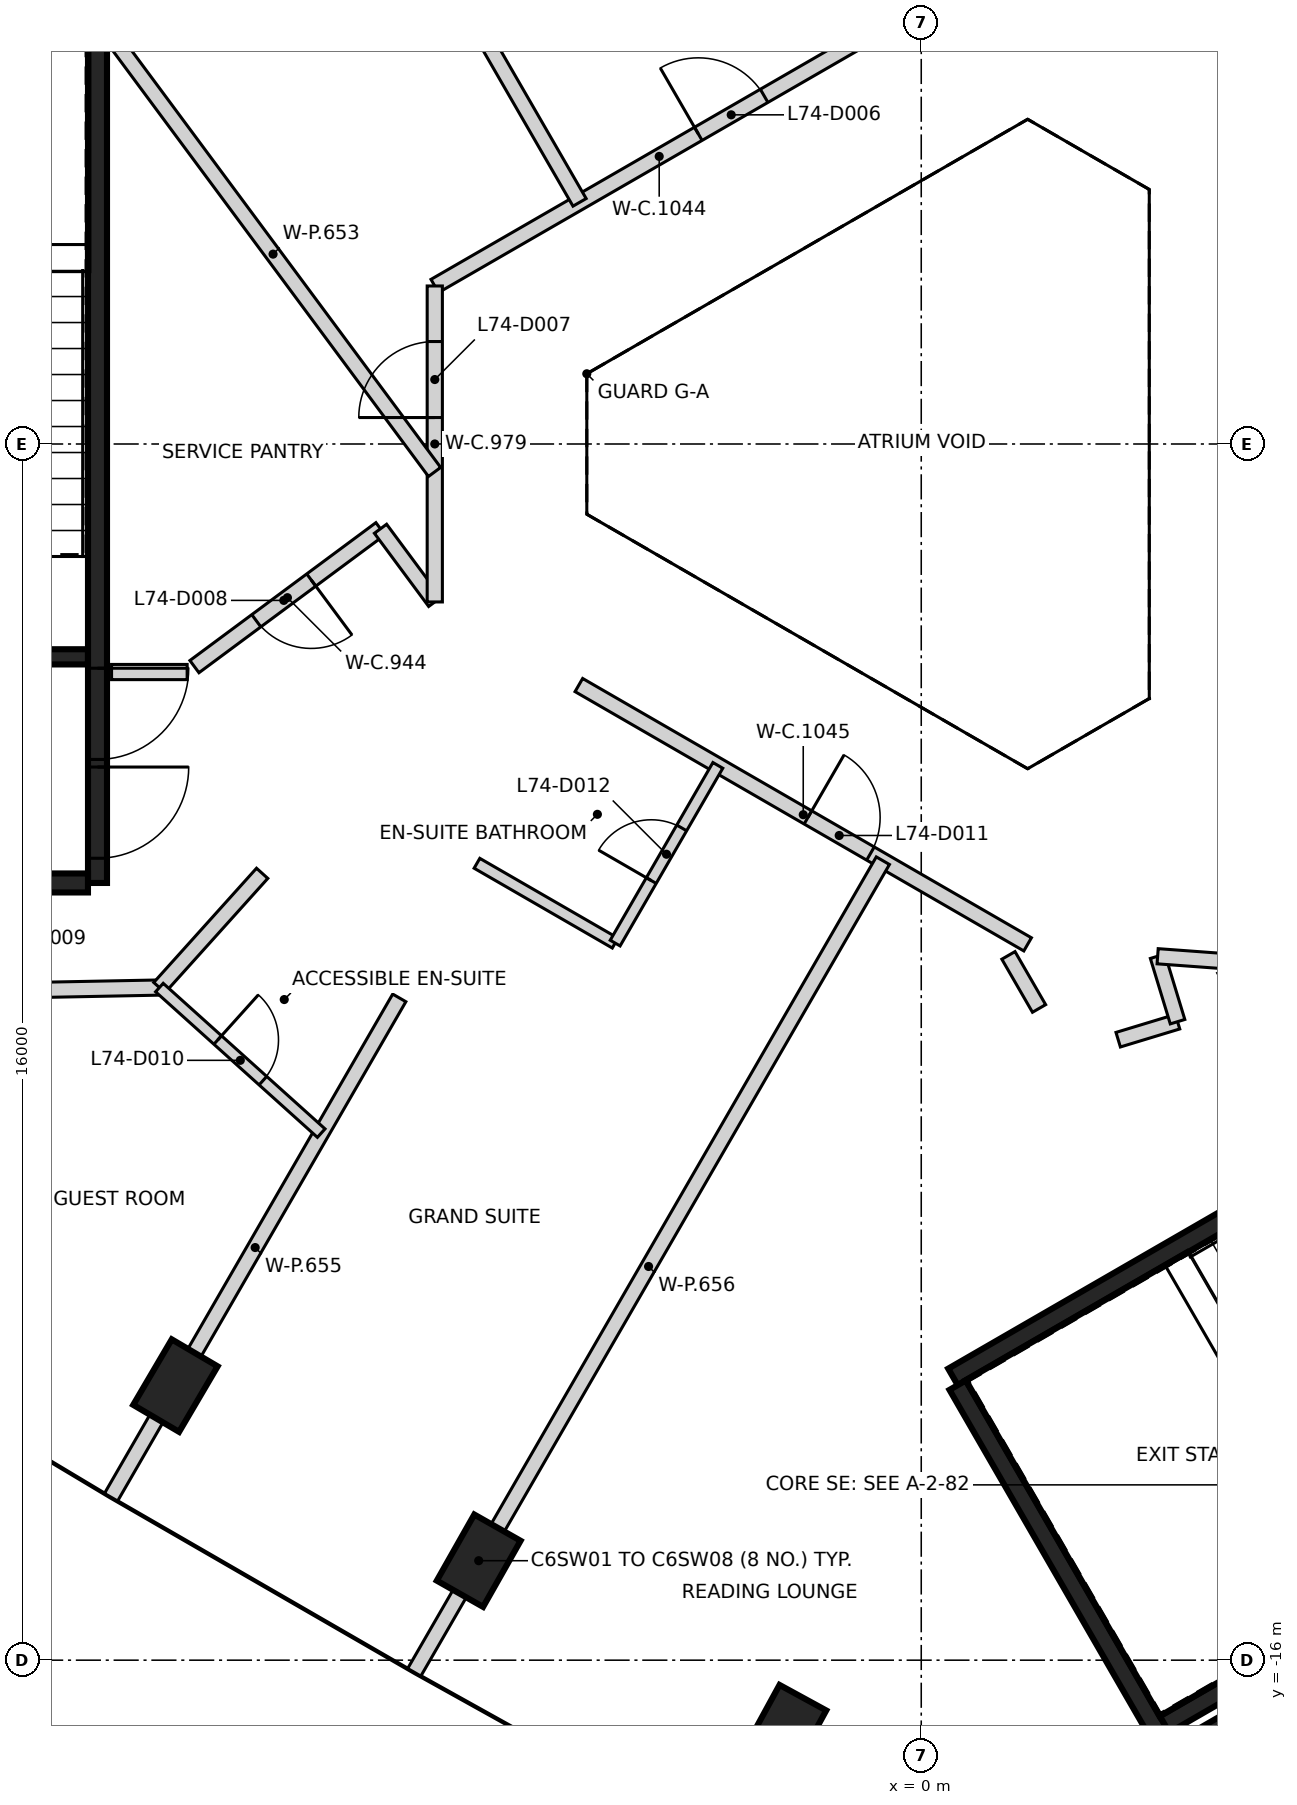
"""IFC4 building model, lengths in metres.
Left out: names, types, materials, properties, quantities, classifications, styles, units other than length and angle.
Written with IfcOpenShell. Run it as: python <this file> out.ifc"""

import sys

from ifc_helpers import new_model, si_unit, direction, frame, frame_2d, origin, origin_2d, place, context, subcontext, project, spatial, rectangle, extrude, element, fill, save


model = new_model("IFC4")
c1 = context("Model", 3, precision=1e-05, world=origin(), true_north=direction((0.0, 1.0)))
c2 = subcontext(c1, "Body", "Model", "MODEL_VIEW")
j1 = project(units=[si_unit("LENGTHUNIT", "METRE"), si_unit("PLANEANGLEUNIT", "RADIAN")], contexts=[c1])
p1 = place(None, origin())
s1 = spatial("IfcSite", under=j1, at=p1, CompositionType="ELEMENT")
p2 = place(p1, origin())
s2 = spatial("IfcBuilding", under=s1, at=p2, CompositionType="ELEMENT")
p3 = place(p2, frame((0.0, 0.0, 294.6)))
s3 = spatial("IfcBuildingStorey", under=s2, at=p3, CompositionType="ELEMENT", Elevation=294.6)
for number, where, z_axis, x_axis in (
    (1, (-9.812, -12.388, -0.35), (0.0, 0.0, 1.0), (0.507, 0.862, 0.0)),
    (2, (-5.822, -14.691, -0.35), (0.0, 0.0, 1.0), (0.493, 0.87, 0.0)),
    (3, (-1.797, -16.932, -0.35), (0.0, 0.0, 1.0), (0.479, 0.878, 0.0)),
):
    element("IfcColumn", number, at=place(p3, frame(where, z_axis=z_axis, x_axis=x_axis)), inside=s3, PredefinedType="COLUMN", context=c2, shape_type="SweptSolid", body=[
        extrude(rectangle(XDim=1.0, YDim=0.7, at=origin_2d()), origin(), (0.0, 0.0, 1.0), 3.6),
    ])
p4 = place(p3, frame((-10.837, 5.775, 0.0), z_axis=(0.0, 0.0, 1.0), x_axis=(0.0, -1.0, 0.0)))
e4 = element("IfcWall", 4, at=p4, inside=s3, PredefinedType="SHEAR", context=c2, shape_type="SweptSolid", body=[
    extrude(rectangle(XDim=11.55, YDim=0.25, at=frame_2d((5.775, 0.0))), origin(), (0.0, 0.0, 1.0), 3.25),
])
p5 = place(p4, frame((10.025, 0.0, 0.0)))
e5 = element("IfcOpeningElement", 5, at=p5, cuts=e4, PredefinedType="OPENING", context=c2, shape_type="SweptSolid", body=[
    extrude(rectangle(XDim=1.2, YDim=2.1, at=frame_2d((0.6, 1.05))), frame((0.0, 0.135, 0.0), z_axis=(0.0, -1.0, 0.0), x_axis=(1.0, 0.0, 0.0)), (0.0, 0.0, 1.0), 0.27),
])
p6 = place(p4, frame((8.725, 0.0, 0.0)))
e6 = element("IfcOpeningElement", 6, at=p6, cuts=e4, PredefinedType="OPENING", context=c2, shape_type="SweptSolid", body=[
    extrude(rectangle(XDim=1.2, YDim=2.1, at=frame_2d((0.6, 1.05))), frame((0.0, 0.135, 0.0), z_axis=(0.0, -1.0, 0.0), x_axis=(1.0, 0.0, 0.0)), (0.0, 0.0, 1.0), 0.27),
])
p7 = place(p3, frame((-10.963, -5.775, 0.0), z_axis=(0.0, 0.0, 1.0), x_axis=(-1.0, 0.0, 0.0)))
e7 = element("IfcWall", 7, at=p7, inside=s3, PredefinedType="SHEAR", context=c2, shape_type="SweptSolid", body=[
    extrude(rectangle(XDim=5.225, YDim=0.25, at=frame_2d((2.612, 0.0))), origin(), (0.0, 0.0, 1.0), 3.25),
])
p8 = place(p3, frame((-10.963, -2.8, 0.0), z_axis=(0.0, 0.0, 1.0), x_axis=(-1.0, 0.0, 0.0)))
e8 = element("IfcWall", 8, at=p8, inside=s3, PredefinedType="SHEAR", context=c2, shape_type="SweptSolid", body=[
    extrude(rectangle(XDim=5.098, YDim=0.2, at=frame_2d((2.549, 0.0))), origin(), (0.0, 0.0, 1.0), 3.25),
])
p9 = place(p8, frame((1.774, 0.0, 0.0)))
e9 = element("IfcOpeningElement", 9, at=p9, cuts=e8, PredefinedType="OPENING", context=c2, shape_type="SweptSolid", body=[
    extrude(rectangle(XDim=1.4, YDim=2.1, at=frame_2d((0.7, 1.05))), frame((0.0, 0.11, 0.0), z_axis=(0.0, -1.0, 0.0), x_axis=(1.0, 0.0, 0.0)), (0.0, 0.0, 1.0), 0.22),
])
p10 = place(p3, frame((0.417, -12.273, 0.0), z_axis=(0.0, 0.0, 1.0), x_axis=(0.866021906294, 0.500006057782, 0.0)))
e10 = element("IfcWall", 10, at=p10, inside=s3, PredefinedType="SHEAR", context=c2, shape_type="SweptSolid", body=[
    extrude(rectangle(XDim=11.55, YDim=0.25, at=frame_2d((5.775, 0.0))), origin(), (0.0, 0.0, 1.0), 3.25),
])
p11 = place(p10, frame((10.025, 0.0, 0.0)))
e11 = element("IfcOpeningElement", 11, at=p11, cuts=e10, PredefinedType="OPENING", context=c2, shape_type="SweptSolid", body=[
    extrude(rectangle(XDim=1.2, YDim=2.1, at=frame_2d((0.6, 1.05))), frame((0.0, 0.135, 0.0), z_axis=(0.0, -1.0, 0.0), x_axis=(1.0, 0.0, 0.0)), (0.0, 0.0, 1.0), 0.27),
])
p12 = place(p10, frame((8.725, 0.0, 0.0)))
e12 = element("IfcOpeningElement", 12, at=p12, cuts=e10, PredefinedType="OPENING", context=c2, shape_type="SweptSolid", body=[
    extrude(rectangle(XDim=1.2, YDim=2.1, at=frame_2d((0.6, 1.05))), frame((0.0, 0.135, 0.0), z_axis=(0.0, -1.0, 0.0), x_axis=(1.0, 0.0, 0.0)), (0.0, 0.0, 1.0), 0.27),
])
p13 = place(p3, frame((3.235, -17.153, 0.0), z_axis=(0.0, 0.0, 1.0), x_axis=(-0.500008851346, 0.866020293397, 0.0)))
e13 = element("IfcWall", 13, at=p13, inside=s3, PredefinedType="SHEAR", context=c2, shape_type="SweptSolid", body=[
    extrude(rectangle(XDim=5.51, YDim=0.25, at=frame_2d((2.755, 0.0))), origin(), (0.0, 0.0, 1.0), 3.25),
])
p14 = place(p3, frame((1.669, -18.19, 0.0), z_axis=(0.0, 0.0, 1.0), x_axis=(0.866042235819, 0.499970844928, 0.0)))
e14 = element("IfcWall", 14, at=p14, inside=s3, PredefinedType="SHEAR", context=c2, shape_type="SweptSolid", body=[
    extrude(rectangle(XDim=2.865, YDim=0.25, at=frame_2d((1.432, 0.0))), origin(), (0.0, 0.0, 1.0), 3.25),
])
p15 = place(p3, frame((5.431, -15.556, 0.0), z_axis=(0.0, 0.0, 1.0), x_axis=(-0.866022940537, -0.500004266446, 0.0)))
e15 = element("IfcWall", 15, at=p15, inside=s3, PredefinedType="SHEAR", context=c2, shape_type="SweptSolid", body=[
    extrude(rectangle(XDim=2.575, YDim=0.25, at=frame_2d((1.287, 0.0))), origin(), (0.0, 0.0, 1.0), 3.25),
])
p16 = place(p3, frame((-16.732, -7.282, 0.0), z_axis=(0.0, 0.0, 1.0), x_axis=(0.999809119854, 0.019537754635, 0.0)))
e16 = element("IfcWall", 16, at=p16, inside=s3, PredefinedType="PARTITIONING", context=c2, shape_type="SweptSolid", body=[
    extrude(rectangle(XDim=6.71, YDim=0.2, at=frame_2d((3.355, 0.0))), origin(), (0.0, 0.0, 1.0), 3.25),
])
p17 = place(p16, frame((3.451, 0.0, 0.0)))
e17 = element("IfcOpeningElement", 17, at=p17, cuts=e16, PredefinedType="OPENING", context=c2, shape_type="SweptSolid", body=[
    extrude(rectangle(XDim=1.0, YDim=2.1, at=frame_2d((0.5, 1.05))), frame((0.0, 0.11, 0.0), z_axis=(0.0, -1.0, 0.0), x_axis=(1.0, 0.0, 0.0)), (0.0, 0.0, 1.0), 0.22),
])
p18 = place(p3, frame((-10.652, -3.0, 0.0), z_axis=(0.0, 0.0, 1.0), x_axis=(1.0, 0.0, 0.0)))
e18 = element("IfcWall", 18, at=p18, inside=s3, PredefinedType="PARTITIONING", context=c2, shape_type="SweptSolid", body=[
    extrude(rectangle(XDim=0.994, YDim=0.2, at=frame_2d((0.497, 0.0))), origin(), (0.0, 0.0, 1.0), 3.25),
])
p19 = place(p3, frame((-10.023, -7.151, 0.0), z_axis=(0.0, 0.0, 1.0), x_axis=(0.668804583793, 0.743438248073, 0.0)))
e19 = element("IfcWall", 19, at=p19, inside=s3, PredefinedType="PARTITIONING", context=c2, shape_type="SweptSolid", body=[
    extrude(rectangle(XDim=2.021, YDim=0.2, at=frame_2d((1.011, 0.0))), origin(), (0.0, 0.0, 1.0), 3.25),
])
p20 = place(p3, frame((-7.115, -1.115, 0.0), z_axis=(0.0, 0.0, 1.0), x_axis=(-0.803344165632, -0.595515030495, 0.0)))
e20 = element("IfcWall", 20, at=p20, inside=s3, PredefinedType="PARTITIONING", context=c2, shape_type="SweptSolid", body=[
    extrude(rectangle(XDim=3.046, YDim=0.2, at=frame_2d((1.523, 0.0))), origin(), (0.0, 0.0, 1.0), 3.25),
])
p21 = place(p20, frame((1.133, 0.0, 0.0)))
e21 = element("IfcOpeningElement", 21, at=p21, cuts=e20, PredefinedType="OPENING", context=c2, shape_type="SweptSolid", body=[
    extrude(rectangle(XDim=0.9, YDim=2.1, at=frame_2d((0.45, 1.05))), frame((0.0, 0.11, 0.0), z_axis=(0.0, -1.0, 0.0), x_axis=(1.0, 0.0, 0.0)), (0.0, 0.0, 1.0), 0.22),
])
p22 = place(p3, frame((-7.114, -1.115, 0.0), z_axis=(0.0, 0.0, 1.0), x_axis=(0.595690139668, -0.803214328496, 0.0)))
e22 = element("IfcWall", 22, at=p22, inside=s3, PredefinedType="PARTITIONING", context=c2, shape_type="SweptSolid", body=[
    extrude(rectangle(XDim=1.199, YDim=0.2, at=frame_2d((0.599, 0.0))), origin(), (0.0, 0.0, 1.0), 3.25),
])
p23 = place(p3, frame((-6.4, 2.079, 0.0), z_axis=(0.0, 0.0, 1.0), x_axis=(0.866037708501, 0.499978687001, 0.0)))
e23 = element("IfcWall", 23, at=p23, inside=s3, PredefinedType="PARTITIONING", context=c2, shape_type="SweptSolid", body=[
    extrude(rectangle(XDim=6.818, YDim=0.2, at=frame_2d((3.409, 0.0))), origin(), (0.0, 0.0, 1.0), 3.25),
])
p24 = place(p23, frame((4.003, 0.0, 0.0)))
e24 = element("IfcOpeningElement", 24, at=p24, cuts=e23, PredefinedType="OPENING", context=c2, shape_type="SweptSolid", body=[
    extrude(rectangle(XDim=1.0, YDim=2.1, at=frame_2d((0.5, 1.05))), frame((0.0, 0.11, 0.0), z_axis=(0.0, -1.0, 0.0), x_axis=(1.0, 0.0, 0.0)), (0.0, 0.0, 1.0), 0.22),
])
p25 = place(p3, frame((-6.4, -2.078, 0.0), z_axis=(0.0, 0.0, 1.0), x_axis=(0.0, 1.0, 0.0)))
e25 = element("IfcWall", 25, at=p25, inside=s3, PredefinedType="PARTITIONING", context=c2, shape_type="SweptSolid", body=[
    extrude(rectangle(XDim=4.157, YDim=0.2, at=frame_2d((2.079, 0.0))), origin(), (0.0, 0.0, 1.0), 3.25),
])
p26 = place(p25, frame((2.426, 0.0, 0.0)))
e26 = element("IfcOpeningElement", 26, at=p26, cuts=e25, PredefinedType="OPENING", context=c2, shape_type="SweptSolid", body=[
    extrude(rectangle(XDim=1.0, YDim=2.1, at=frame_2d((0.5, 1.05))), frame((0.0, 0.11, 0.0), z_axis=(0.0, -1.0, 0.0), x_axis=(1.0, 0.0, 0.0)), (0.0, 0.0, 1.0), 0.22),
])
p27 = place(p3, frame((-4.505, -3.171, 0.0), z_axis=(0.0, 0.0, 1.0), x_axis=(0.865849219471, -0.500305036094, 0.0)))
e27 = element("IfcWall", 27, at=p27, inside=s3, PredefinedType="PARTITIONING", context=c2, shape_type="SweptSolid", body=[
    extrude(rectangle(XDim=6.819, YDim=0.2, at=frame_2d((3.41, 0.0))), origin(), (0.0, 0.0, 1.0), 3.25),
])
p28 = place(p27, frame((3.481, 0.0, 0.0)))
e28 = element("IfcOpeningElement", 28, at=p28, cuts=e27, PredefinedType="OPENING", context=c2, shape_type="SweptSolid", body=[
    extrude(rectangle(XDim=0.95, YDim=2.1, at=frame_2d((0.475, 1.05))), frame((0.0, 0.11, 0.0), z_axis=(0.0, -1.0, 0.0), x_axis=(1.0, 0.0, 0.0)), (0.0, 0.0, 1.0), 0.22),
])
p29 = place(p3, frame((1.147, -6.728, 0.0), z_axis=(0.0, 0.0, 1.0), x_axis=(0.500080775649, -0.865978762919, 0.0)))
e29 = element("IfcWall", 29, at=p29, inside=s3, PredefinedType="PARTITIONING", context=c2, shape_type="SweptSolid", body=[
    extrude(rectangle(XDim=0.806, YDim=0.2, at=frame_2d((0.403, 0.0))), origin(), (0.0, 0.0, 1.0), 3.25),
])
p30 = place(p3, frame((2.591, -7.837, 0.0), z_axis=(0.0, 0.0, 1.0), x_axis=(0.956974070788, 0.290173444409, 0.0)))
e30 = element("IfcWall", 30, at=p30, inside=s3, PredefinedType="PARTITIONING", context=c2, shape_type="SweptSolid", body=[
    extrude(rectangle(XDim=0.816, YDim=0.2, at=frame_2d((0.408, 0.0))), origin(), (0.0, 0.0, 1.0), 3.25),
])
p31 = place(p3, frame((3.11, -6.739, 0.0), z_axis=(0.0, 0.0, 1.0), x_axis=(0.291053676179, -0.95670672496, 0.0)))
e31 = element("IfcWall", 31, at=p31, inside=s3, PredefinedType="PARTITIONING", context=c2, shape_type="SweptSolid", body=[
    extrude(rectangle(XDim=0.9, YDim=0.2, at=frame_2d((0.45, 0.0))), origin(), (0.0, 0.0, 1.0), 3.25),
])
p32 = place(p3, frame((3.11, -6.739, 0.0), z_axis=(0.0, 0.0, 1.0), x_axis=(0.997306047238, -0.073352901386, 0.0)))
e32 = element("IfcWall", 32, at=p32, inside=s3, PredefinedType="PARTITIONING", context=c2, shape_type="SweptSolid", body=[
    extrude(rectangle(XDim=0.832, YDim=0.2, at=frame_2d((0.416, 0.0))), origin(), (0.0, 0.0, 1.0), 3.25),
])
p33 = place(p3, frame((-10.652, 5.364, 0.0), z_axis=(0.0, 0.0, 1.0), x_axis=(0.595550732464, -0.803317698711, 0.0)))
e33 = element("IfcWall", 33, at=p33, inside=s3, PredefinedType="PARTITIONING", context=c2, shape_type="SweptSolid", body=[
    extrude(rectangle(XDim=7.135, YDim=0.2, at=frame_2d((3.567, 0.0))), origin(), (0.0, 0.0, 1.0), 3.25),
])
p34 = place(p3, frame((-10.659, 13.856, 0.0), z_axis=(0.0, 0.0, 1.0), x_axis=(0.500004723409, -0.866022676706, 0.0)))
e34 = element("IfcWall", 34, at=p34, inside=s3, PredefinedType="PARTITIONING", context=c2, shape_type="SweptSolid", body=[
    extrude(rectangle(XDim=12.329, YDim=0.2, at=frame_2d((6.164, 0.0))), origin(), (0.0, 0.0, 1.0), 3.25),
])
p35 = place(p3, frame((-10.659, -13.856, 0.0), z_axis=(0.0, 0.0, 1.0), x_axis=(0.49995742368, 0.866049983839, 0.0)))
e35 = element("IfcWall", 35, at=p35, inside=s3, PredefinedType="PARTITIONING", context=c2, shape_type="SweptSolid", body=[
    extrude(rectangle(XDim=7.585, YDim=0.2, at=frame_2d((3.792, 0.0))), origin(), (0.0, 0.0, 1.0), 3.25),
])
p36 = place(p3, frame((-6.67, -16.159, 0.0), z_axis=(0.0, 0.0, 1.0), x_axis=(0.500017276951, 0.866015428702, 0.0)))
e36 = element("IfcWall", 36, at=p36, inside=s3, PredefinedType="PARTITIONING", context=c2, shape_type="SweptSolid", body=[
    extrude(rectangle(XDim=12.329, YDim=0.2, at=frame_2d((6.165, 0.0))), origin(), (0.0, 0.0, 1.0), 3.25),
])
p37 = place(p3, frame((-10.023, -7.151, 0.0), z_axis=(0.0, 0.0, 1.0), x_axis=(0.743463699468, -0.668776291127, 0.0)))
e37 = element("IfcWall", 37, at=p37, inside=s3, PredefinedType="PARTITIONING", context=c2, shape_type="SweptSolid", body=[
    extrude(rectangle(XDim=2.864, YDim=0.15, at=frame_2d((1.432, 0.0))), origin(), (0.0, 0.0, 1.0), 3.25),
])
p38 = place(p37, frame((1.032, 0.0, 0.0)))
e38 = element("IfcOpeningElement", 38, at=p38, cuts=e37, PredefinedType="OPENING", context=c2, shape_type="SweptSolid", body=[
    extrude(rectangle(XDim=0.8, YDim=2.1, at=frame_2d((0.4, 1.05))), frame((0.0, 0.085, 0.0), z_axis=(0.0, -1.0, 0.0), x_axis=(1.0, 0.0, 0.0)), (0.0, 0.0, 1.0), 0.17),
])
p39 = place(p3, frame((-5.845, -5.516, 0.0), z_axis=(0.0, 0.0, 1.0), x_axis=(0.865972526687, -0.500091574638, 0.0)))
e39 = element("IfcWall", 39, at=p39, inside=s3, PredefinedType="PARTITIONING", context=c2, shape_type="SweptSolid", body=[
    extrude(rectangle(XDim=2.099, YDim=0.15, at=frame_2d((1.05, 0.0))), origin(), (0.0, 0.0, 1.0), 3.25),
])
p40 = place(p3, frame((-4.027, -6.566, 0.0), z_axis=(0.0, 0.0, 1.0), x_axis=(0.500358939419, 0.865818070812, 0.0)))
e40 = element("IfcWall", 40, at=p40, inside=s3, PredefinedType="PARTITIONING", context=c2, shape_type="SweptSolid", body=[
    extrude(rectangle(XDim=2.7, YDim=0.15, at=frame_2d((1.35, 0.0))), origin(), (0.0, 0.0, 1.0), 3.25),
])
p41 = place(p40, frame((0.95, 0.0, 0.0)))
e41 = element("IfcOpeningElement", 41, at=p41, cuts=e40, PredefinedType="OPENING", context=c2, shape_type="SweptSolid", body=[
    extrude(rectangle(XDim=0.8, YDim=2.1, at=frame_2d((0.4, 1.05))), frame((0.0, 0.085, 0.0), z_axis=(0.0, -1.0, 0.0), x_axis=(1.0, 0.0, 0.0)), (0.0, 0.0, 1.0), 0.17),
])
p42 = place(p5, origin())
e42 = element("IfcDoor", 42, at=p42, inside=s3, OperationType="SINGLE_SWING_LEFT", PredefinedType="DOOR", context=c2, shape_type="SweptSolid", body=[
    extrude(rectangle(XDim=1.2, YDim=2.1, at=frame_2d((0.6, 1.05))), frame((0.0, 0.025, 0.0), z_axis=(0.0, -1.0, 0.0), x_axis=(1.0, 0.0, 0.0)), (0.0, 0.0, 1.0), 0.05),
])
fill(e5, e42)
p43 = place(p6, origin())
e43 = element("IfcDoor", 43, at=p43, inside=s3, OperationType="SINGLE_SWING_RIGHT", PredefinedType="DOOR", context=c2, shape_type="SweptSolid", body=[
    extrude(rectangle(XDim=1.2, YDim=2.1, at=frame_2d((0.6, 1.05))), frame((0.0, 0.025, 0.0), z_axis=(0.0, -1.0, 0.0), x_axis=(1.0, 0.0, 0.0)), (0.0, 0.0, 1.0), 0.05),
])
fill(e6, e43)
p44 = place(p24, origin())
e44 = element("IfcDoor", 44, at=p44, inside=s3, OperationType="SINGLE_SWING_LEFT", PredefinedType="DOOR", context=c2, shape_type="SweptSolid", body=[
    extrude(rectangle(XDim=1.0, YDim=2.1, at=frame_2d((0.5, 1.05))), frame((0.0, 0.025, 0.0), z_axis=(0.0, -1.0, 0.0), x_axis=(1.0, 0.0, 0.0)), (0.0, 0.0, 1.0), 0.05),
])
fill(e24, e44)
p45 = place(p26, origin())
e45 = element("IfcDoor", 45, at=p45, inside=s3, OperationType="SINGLE_SWING_LEFT", PredefinedType="DOOR", context=c2, shape_type="SweptSolid", body=[
    extrude(rectangle(XDim=1.0, YDim=2.1, at=frame_2d((0.5, 1.05))), frame((0.0, 0.025, 0.0), z_axis=(0.0, -1.0, 0.0), x_axis=(1.0, 0.0, 0.0)), (0.0, 0.0, 1.0), 0.05),
])
fill(e26, e45)
p46 = place(p21, origin())
e46 = element("IfcDoor", 46, at=p46, inside=s3, OperationType="SINGLE_SWING_LEFT", PredefinedType="DOOR", context=c2, shape_type="SweptSolid", body=[
    extrude(rectangle(XDim=0.9, YDim=2.1, at=frame_2d((0.45, 1.05))), frame((0.0, 0.025, 0.0), z_axis=(0.0, -1.0, 0.0), x_axis=(1.0, 0.0, 0.0)), (0.0, 0.0, 1.0), 0.05),
])
fill(e21, e46)
p47 = place(p38, frame((0.8, 0.0, 0.0), z_axis=(0.0, 0.0, 1.0), x_axis=(-1.0, 0.0, 0.0)))
e47 = element("IfcDoor", 47, at=p47, inside=s3, OperationType="SINGLE_SWING_LEFT", PredefinedType="DOOR", context=c2, shape_type="SweptSolid", body=[
    extrude(rectangle(XDim=0.8, YDim=2.1, at=frame_2d((0.4, 1.05))), frame((0.0, 0.025, 0.0), z_axis=(0.0, -1.0, 0.0), x_axis=(1.0, 0.0, 0.0)), (0.0, 0.0, 1.0), 0.05),
])
fill(e38, e47)
p48 = place(p28, frame((0.95, 0.0, 0.0), z_axis=(0.0, 0.0, 1.0), x_axis=(-1.0, 0.0, 0.0)))
e48 = element("IfcDoor", 48, at=p48, inside=s3, OperationType="SINGLE_SWING_LEFT", PredefinedType="DOOR", context=c2, shape_type="SweptSolid", body=[
    extrude(rectangle(XDim=0.95, YDim=2.1, at=frame_2d((0.475, 1.05))), frame((0.0, 0.025, 0.0), z_axis=(0.0, -1.0, 0.0), x_axis=(1.0, 0.0, 0.0)), (0.0, 0.0, 1.0), 0.05),
])
fill(e28, e48)
p49 = place(p41, frame((0.8, 0.0, 0.0), z_axis=(0.0, 0.0, 1.0), x_axis=(-1.0, 0.0, 0.0)))
e49 = element("IfcDoor", 49, at=p49, inside=s3, OperationType="SINGLE_SWING_LEFT", PredefinedType="DOOR", context=c2, shape_type="SweptSolid", body=[
    extrude(rectangle(XDim=0.8, YDim=2.1, at=frame_2d((0.4, 1.05))), frame((0.0, 0.025, 0.0), z_axis=(0.0, -1.0, 0.0), x_axis=(1.0, 0.0, 0.0)), (0.0, 0.0, 1.0), 0.05),
])
fill(e41, e49)
save(model, sys.argv[1])
